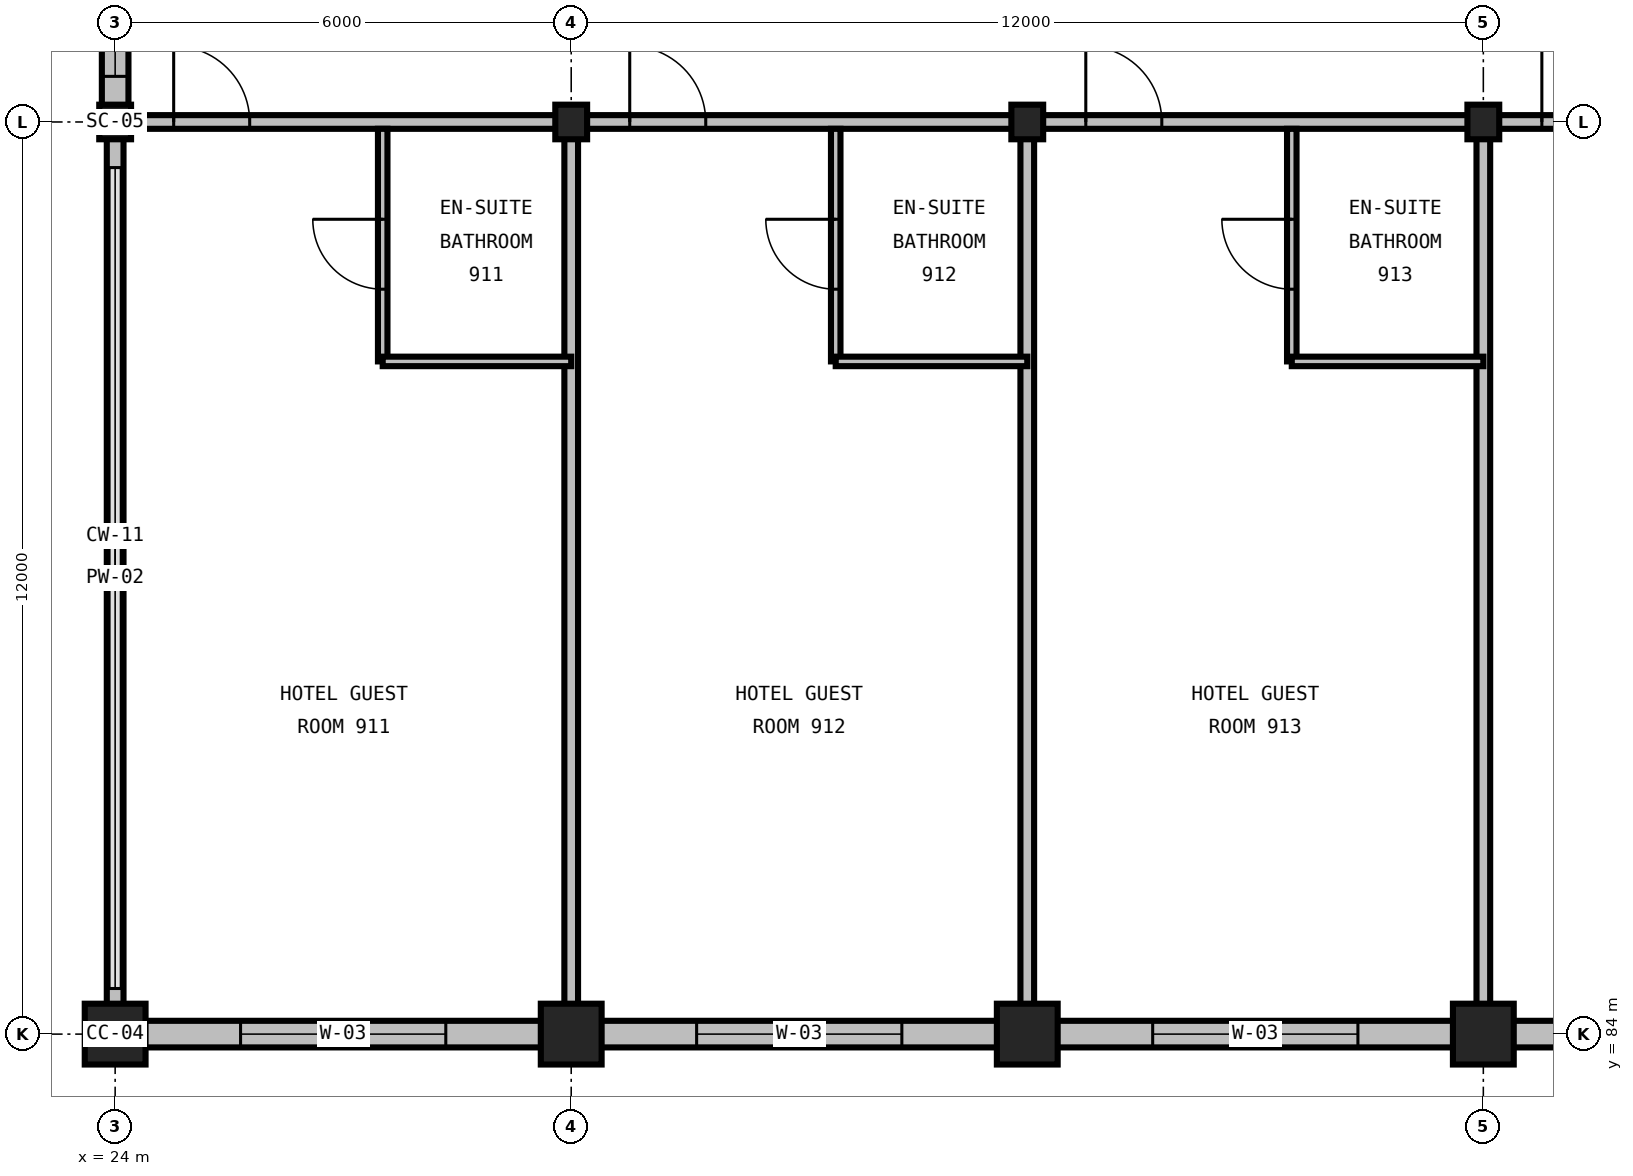
"""IFC4 building model, lengths in metres.
Left out: names, types, materials, properties, quantities, classifications, styles, units other than length and angle.
Written with IfcOpenShell. Run it as: python <this file> out.ifc"""

import sys

from ifc_helpers import new_model, si_unit, direction, frame, frame_2d, origin, origin_2d, place, context, subcontext, project, spatial, rectangle, i_section, extrude, element, fill, save


model = new_model("IFC4")
c1 = context("Model", 3, precision=1e-05, world=origin(), true_north=direction((0.0, 1.0)))
c2 = subcontext(c1, "Body", "Model", "MODEL_VIEW")
j1 = project(units=[si_unit("LENGTHUNIT", "METRE"), si_unit("PLANEANGLEUNIT", "RADIAN")], contexts=[c1])
p1 = place(None, origin())
s1 = spatial("IfcSite", under=j1, at=p1, CompositionType="ELEMENT")
p2 = place(p1, origin())
s2 = spatial("IfcBuilding", under=s1, at=p2, CompositionType="ELEMENT")
p3 = place(p2, frame((0.0, 0.0, 42.0)))
s3 = spatial("IfcBuildingStorey", under=s2, at=p3, CompositionType="ELEMENT", Elevation=42.0)
p4 = place(p3, frame((24.0, 84.0, 0.0), z_axis=(0.0, 0.0, 1.0), x_axis=(1.0, 0.0, 0.0)))
e1 = element("IfcColumn", 1, at=p4, inside=s3, PredefinedType="COLUMN", context=c2, shape_type="SweptSolid", body=[
    extrude(rectangle(XDim=0.8, YDim=0.8, at=origin_2d()), origin(), (0.0, 0.0, 1.0), 3.6),
])
p5 = place(p3, frame((24.0, 96.0, 0.0), z_axis=(0.0, 0.0, 1.0), x_axis=(1.0, 0.0, 0.0)))
e2 = element("IfcColumn", 2, at=p5, inside=s3, PredefinedType="COLUMN", context=c2, shape_type="SweptSolid", body=[
    extrude(i_section(OverallWidth=0.419, OverallDepth=0.455, WebThickness=0.042, FlangeThickness=0.068, FilletRadius=0.031, at=origin_2d()), origin(), (0.0, 0.0, 1.0), 3.6),
])
p6 = place(p3, frame((30.0, 84.0, 0.0), z_axis=(0.0, 0.0, 1.0), x_axis=(1.0, 0.0, 0.0)))
e3 = element("IfcColumn", 3, at=p6, inside=s3, PredefinedType="COLUMN", context=c2, shape_type="SweptSolid", body=[
    extrude(rectangle(XDim=0.8, YDim=0.8, at=origin_2d()), origin(), (0.0, 0.0, 1.0), 3.6),
])
p7 = place(p3, frame((30.0, 96.0, 0.0), z_axis=(0.0, 0.0, 1.0), x_axis=(1.0, 0.0, 0.0)))
e4 = element("IfcColumn", 4, at=p7, inside=s3, PredefinedType="COLUMN", context=c2, shape_type="SweptSolid", body=[
    extrude(i_section(OverallWidth=0.419, OverallDepth=0.455, WebThickness=0.042, FlangeThickness=0.068, FilletRadius=0.031, at=origin_2d()), origin(), (0.0, 0.0, 1.0), 3.6),
])
p8 = place(p3, frame((36.0, 84.0, 0.0), z_axis=(0.0, 0.0, 1.0), x_axis=(1.0, 0.0, 0.0)))
e5 = element("IfcColumn", 5, at=p8, inside=s3, PredefinedType="COLUMN", context=c2, shape_type="SweptSolid", body=[
    extrude(rectangle(XDim=0.8, YDim=0.8, at=origin_2d()), origin(), (0.0, 0.0, 1.0), 3.6),
])
p9 = place(p3, frame((36.0, 96.0, 0.0), z_axis=(0.0, 0.0, 1.0), x_axis=(1.0, 0.0, 0.0)))
e6 = element("IfcColumn", 6, at=p9, inside=s3, PredefinedType="COLUMN", context=c2, shape_type="SweptSolid", body=[
    extrude(i_section(OverallWidth=0.419, OverallDepth=0.455, WebThickness=0.042, FlangeThickness=0.068, FilletRadius=0.031, at=origin_2d()), origin(), (0.0, 0.0, 1.0), 3.6),
])
p10 = place(p3, frame((42.0, 84.0, 0.0), z_axis=(0.0, 0.0, 1.0), x_axis=(1.0, 0.0, 0.0)))
e7 = element("IfcColumn", 7, at=p10, inside=s3, PredefinedType="COLUMN", context=c2, shape_type="SweptSolid", body=[
    extrude(rectangle(XDim=0.8, YDim=0.8, at=origin_2d()), origin(), (0.0, 0.0, 1.0), 3.6),
])
p11 = place(p3, frame((42.0, 96.0, 0.0), z_axis=(0.0, 0.0, 1.0), x_axis=(1.0, 0.0, 0.0)))
e8 = element("IfcColumn", 8, at=p11, inside=s3, PredefinedType="COLUMN", context=c2, shape_type="SweptSolid", body=[
    extrude(i_section(OverallWidth=0.419, OverallDepth=0.455, WebThickness=0.042, FlangeThickness=0.068, FilletRadius=0.031, at=origin_2d()), origin(), (0.0, 0.0, 1.0), 3.6),
])
p12 = place(p3, frame((24.0, 84.0, 0.0), z_axis=(0.0, 0.0, 1.0), x_axis=(1.0, 0.0, 0.0)))
e9 = element("IfcWall", 9, at=p12, inside=s3, PredefinedType="STANDARD", context=c2, shape_type="SweptSolid", body=[
    extrude(rectangle(XDim=6.0, YDim=0.35, at=frame_2d((3.0, 0.0))), origin(), (0.0, 0.0, 1.0), 2.486),
])
p13 = place(p12, frame((1.65, 0.0, 0.72)))
e10 = element("IfcOpeningElement", 10, at=p13, cuts=e9, PredefinedType="OPENING", context=c2, shape_type="SweptSolid", body=[
    extrude(rectangle(XDim=2.7, YDim=1.65, at=frame_2d((1.35, 0.825))), frame((0.0, 0.19, 0.0), z_axis=(0.0, -1.0, 0.0), x_axis=(1.0, 0.0, 0.0)), (0.0, 0.0, 1.0), 0.38),
])
p14 = place(p3, frame((30.0, 84.0, 0.0), z_axis=(0.0, 0.0, 1.0), x_axis=(1.0, 0.0, 0.0)))
e11 = element("IfcWall", 11, at=p14, inside=s3, PredefinedType="STANDARD", context=c2, shape_type="SweptSolid", body=[
    extrude(rectangle(XDim=6.0, YDim=0.35, at=frame_2d((3.0, 0.0))), origin(), (0.0, 0.0, 1.0), 2.486),
])
p15 = place(p14, frame((1.65, 0.0, 0.72)))
e12 = element("IfcOpeningElement", 12, at=p15, cuts=e11, PredefinedType="OPENING", context=c2, shape_type="SweptSolid", body=[
    extrude(rectangle(XDim=2.7, YDim=1.65, at=frame_2d((1.35, 0.825))), frame((0.0, 0.19, 0.0), z_axis=(0.0, -1.0, 0.0), x_axis=(1.0, 0.0, 0.0)), (0.0, 0.0, 1.0), 0.38),
])
p16 = place(p3, frame((36.0, 84.0, 0.0), z_axis=(0.0, 0.0, 1.0), x_axis=(1.0, 0.0, 0.0)))
e13 = element("IfcWall", 13, at=p16, inside=s3, PredefinedType="STANDARD", context=c2, shape_type="SweptSolid", body=[
    extrude(rectangle(XDim=6.0, YDim=0.35, at=frame_2d((3.0, 0.0))), origin(), (0.0, 0.0, 1.0), 2.486),
])
p17 = place(p16, frame((1.65, 0.0, 0.72)))
e14 = element("IfcOpeningElement", 14, at=p17, cuts=e13, PredefinedType="OPENING", context=c2, shape_type="SweptSolid", body=[
    extrude(rectangle(XDim=2.7, YDim=1.65, at=frame_2d((1.35, 0.825))), frame((0.0, 0.19, 0.0), z_axis=(0.0, -1.0, 0.0), x_axis=(1.0, 0.0, 0.0)), (0.0, 0.0, 1.0), 0.38),
])
p18 = place(p3, frame((42.0, 84.0, 0.0), z_axis=(0.0, 0.0, 1.0), x_axis=(1.0, 0.0, 0.0)))
e15 = element("IfcWall", 15, at=p18, inside=s3, PredefinedType="STANDARD", context=c2, shape_type="SweptSolid", body=[
    extrude(rectangle(XDim=12.0, YDim=0.35, at=frame_2d((6.0, 0.0))), origin(), (0.0, 0.0, 1.0), 2.486),
])
p19 = place(p18, frame((1.65, 0.0, 0.72)))
e16 = element("IfcOpeningElement", 16, at=p19, cuts=e15, PredefinedType="OPENING", context=c2, shape_type="SweptSolid", body=[
    extrude(rectangle(XDim=2.7, YDim=1.65, at=frame_2d((1.35, 0.825))), frame((0.0, 0.19, 0.0), z_axis=(0.0, -1.0, 0.0), x_axis=(1.0, 0.0, 0.0)), (0.0, 0.0, 1.0), 0.38),
])
p20 = place(p18, frame((7.65, 0.0, 0.72)))
e17 = element("IfcOpeningElement", 17, at=p20, cuts=e15, PredefinedType="OPENING", context=c2, shape_type="SweptSolid", body=[
    extrude(rectangle(XDim=2.7, YDim=1.65, at=frame_2d((1.35, 0.825))), frame((0.0, 0.19, 0.0), z_axis=(0.0, -1.0, 0.0), x_axis=(1.0, 0.0, 0.0)), (0.0, 0.0, 1.0), 0.38),
])
p21 = place(p3, frame((24.0, 96.0, 0.0), z_axis=(0.0, 0.0, 1.0), x_axis=(0.0, -1.0, 0.0)))
e18 = element("IfcWall", 18, at=p21, inside=s3, PredefinedType="PARAPET", context=c2, shape_type="SweptSolid", body=[
    extrude(rectangle(XDim=12.0, YDim=0.22, at=frame_2d((6.0, 0.0))), origin(), (0.0, 0.0, 1.0), 0.2),
])
p22 = place(p3, frame((24.0, 105.0, 0.0), z_axis=(0.0, 0.0, 1.0), x_axis=(0.0, -1.0, 0.0)))
e19 = element("IfcWall", 19, at=p22, inside=s3, PredefinedType="STANDARD", context=c2, shape_type="SweptSolid", body=[
    extrude(rectangle(XDim=9.0, YDim=0.35, at=frame_2d((4.5, 0.0))), origin(), (0.0, 0.0, 1.0), 2.981),
])
p23 = place(p22, frame((6.6, 0.0, 0.85)))
e20 = element("IfcOpeningElement", 20, at=p23, cuts=e19, PredefinedType="OPENING", context=c2, shape_type="SweptSolid", body=[
    extrude(rectangle(XDim=1.8, YDim=1.5, at=frame_2d((0.9, 0.75))), frame((0.0, 0.19, 0.0), z_axis=(0.0, -1.0, 0.0), x_axis=(1.0, 0.0, 0.0)), (0.0, 0.0, 1.0), 0.38),
])
p24 = place(p3, frame((24.085, 96.0, 0.0), z_axis=(0.0, 0.0, 1.0), x_axis=(1.0, 0.0, 0.0)))
e21 = element("IfcWall", 21, at=p24, inside=s3, PredefinedType="PARTITIONING", context=c2, shape_type="SweptSolid", body=[
    extrude(rectangle(XDim=5.915, YDim=0.18, at=frame_2d((2.957, 0.0))), origin(), (0.0, 0.0, 1.0), 2.736),
])
p25 = place(p24, frame((0.685, 0.0, 0.0)))
e22 = element("IfcOpeningElement", 22, at=p25, cuts=e21, PredefinedType="OPENING", context=c2, shape_type="SweptSolid", body=[
    extrude(rectangle(XDim=1.0, YDim=2.15, at=frame_2d((0.5, 1.075))), frame((0.0, 0.105, 0.0), z_axis=(0.0, -1.0, 0.0), x_axis=(1.0, 0.0, 0.0)), (0.0, 0.0, 1.0), 0.21),
])
p26 = place(p3, frame((30.0, 84.175, 0.0), z_axis=(0.0, 0.0, 1.0), x_axis=(0.0, 1.0, 0.0)))
e23 = element("IfcWall", 23, at=p26, inside=s3, PredefinedType="PARTITIONING", context=c2, shape_type="SweptSolid", body=[
    extrude(rectangle(XDim=11.825, YDim=0.18, at=frame_2d((5.913, 0.0))), origin(), (0.0, 0.0, 1.0), 2.59),
])
p27 = place(p3, frame((27.52, 92.85, 0.0), z_axis=(0.0, 0.0, 1.0), x_axis=(0.0, 1.0, 0.0)))
e24 = element("IfcWall", 24, at=p27, inside=s3, PredefinedType="PARTITIONING", context=c2, shape_type="SweptSolid", body=[
    extrude(rectangle(XDim=3.06, YDim=0.125, at=frame_2d((1.53, 0.0))), origin(), (0.0, 0.0, 1.0), 3.29),
])
p28 = place(p27, frame((0.95, 0.0, 0.0)))
e25 = element("IfcOpeningElement", 25, at=p28, cuts=e24, PredefinedType="OPENING", context=c2, shape_type="SweptSolid", body=[
    extrude(rectangle(XDim=0.92, YDim=2.1, at=frame_2d((0.46, 1.05))), frame((0.0, 0.077, 0.0), z_axis=(0.0, -1.0, 0.0), x_axis=(1.0, 0.0, 0.0)), (0.0, 0.0, 1.0), 0.155),
])
p29 = place(p3, frame((27.52, 92.85, 0.0), z_axis=(0.0, 0.0, 1.0), x_axis=(1.0, 0.0, 0.0)))
e26 = element("IfcWall", 26, at=p29, inside=s3, PredefinedType="PARTITIONING", context=c2, shape_type="SweptSolid", body=[
    extrude(rectangle(XDim=2.48, YDim=0.125, at=frame_2d((1.24, 0.0))), origin(), (0.0, 0.0, 1.0), 3.29),
])
p30 = place(p3, frame((30.0, 96.0, 0.0), z_axis=(0.0, 0.0, 1.0), x_axis=(1.0, 0.0, 0.0)))
e27 = element("IfcWall", 27, at=p30, inside=s3, PredefinedType="PARTITIONING", context=c2, shape_type="SweptSolid", body=[
    extrude(rectangle(XDim=6.0, YDim=0.18, at=frame_2d((3.0, 0.0))), origin(), (0.0, 0.0, 1.0), 2.736),
])
p31 = place(p30, frame((0.77, 0.0, 0.0)))
e28 = element("IfcOpeningElement", 28, at=p31, cuts=e27, PredefinedType="OPENING", context=c2, shape_type="SweptSolid", body=[
    extrude(rectangle(XDim=1.0, YDim=2.15, at=frame_2d((0.5, 1.075))), frame((0.0, 0.105, 0.0), z_axis=(0.0, -1.0, 0.0), x_axis=(1.0, 0.0, 0.0)), (0.0, 0.0, 1.0), 0.21),
])
p32 = place(p3, frame((36.0, 84.175, 0.0), z_axis=(0.0, 0.0, 1.0), x_axis=(0.0, 1.0, 0.0)))
e29 = element("IfcWall", 29, at=p32, inside=s3, PredefinedType="PARTITIONING", context=c2, shape_type="SweptSolid", body=[
    extrude(rectangle(XDim=11.825, YDim=0.18, at=frame_2d((5.913, 0.0))), origin(), (0.0, 0.0, 1.0), 2.59),
])
p33 = place(p3, frame((33.48, 92.85, 0.0), z_axis=(0.0, 0.0, 1.0), x_axis=(0.0, 1.0, 0.0)))
e30 = element("IfcWall", 30, at=p33, inside=s3, PredefinedType="PARTITIONING", context=c2, shape_type="SweptSolid", body=[
    extrude(rectangle(XDim=3.06, YDim=0.125, at=frame_2d((1.53, 0.0))), origin(), (0.0, 0.0, 1.0), 3.29),
])
p34 = place(p33, frame((0.95, 0.0, 0.0)))
e31 = element("IfcOpeningElement", 31, at=p34, cuts=e30, PredefinedType="OPENING", context=c2, shape_type="SweptSolid", body=[
    extrude(rectangle(XDim=0.92, YDim=2.1, at=frame_2d((0.46, 1.05))), frame((0.0, 0.077, 0.0), z_axis=(0.0, -1.0, 0.0), x_axis=(1.0, 0.0, 0.0)), (0.0, 0.0, 1.0), 0.155),
])
p35 = place(p3, frame((33.48, 92.85, 0.0), z_axis=(0.0, 0.0, 1.0), x_axis=(1.0, 0.0, 0.0)))
e32 = element("IfcWall", 32, at=p35, inside=s3, PredefinedType="PARTITIONING", context=c2, shape_type="SweptSolid", body=[
    extrude(rectangle(XDim=2.52, YDim=0.125, at=frame_2d((1.26, 0.0))), origin(), (0.0, 0.0, 1.0), 3.29),
])
p36 = place(p3, frame((36.0, 96.0, 0.0), z_axis=(0.0, 0.0, 1.0), x_axis=(1.0, 0.0, 0.0)))
e33 = element("IfcWall", 33, at=p36, inside=s3, PredefinedType="PARTITIONING", context=c2, shape_type="SweptSolid", body=[
    extrude(rectangle(XDim=6.0, YDim=0.18, at=frame_2d((3.0, 0.0))), origin(), (0.0, 0.0, 1.0), 2.736),
])
p37 = place(p36, frame((0.77, 0.0, 0.0)))
e34 = element("IfcOpeningElement", 34, at=p37, cuts=e33, PredefinedType="OPENING", context=c2, shape_type="SweptSolid", body=[
    extrude(rectangle(XDim=1.0, YDim=2.15, at=frame_2d((0.5, 1.075))), frame((0.0, 0.105, 0.0), z_axis=(0.0, -1.0, 0.0), x_axis=(1.0, 0.0, 0.0)), (0.0, 0.0, 1.0), 0.21),
])
p38 = place(p3, frame((42.0, 84.175, 0.0), z_axis=(0.0, 0.0, 1.0), x_axis=(0.0, 1.0, 0.0)))
e35 = element("IfcWall", 35, at=p38, inside=s3, PredefinedType="PARTITIONING", context=c2, shape_type="SweptSolid", body=[
    extrude(rectangle(XDim=11.825, YDim=0.18, at=frame_2d((5.913, 0.0))), origin(), (0.0, 0.0, 1.0), 2.59),
])
p39 = place(p3, frame((39.48, 92.85, 0.0), z_axis=(0.0, 0.0, 1.0), x_axis=(0.0, 1.0, 0.0)))
e36 = element("IfcWall", 36, at=p39, inside=s3, PredefinedType="PARTITIONING", context=c2, shape_type="SweptSolid", body=[
    extrude(rectangle(XDim=3.06, YDim=0.125, at=frame_2d((1.53, 0.0))), origin(), (0.0, 0.0, 1.0), 3.29),
])
p40 = place(p39, frame((0.95, 0.0, 0.0)))
e37 = element("IfcOpeningElement", 37, at=p40, cuts=e36, PredefinedType="OPENING", context=c2, shape_type="SweptSolid", body=[
    extrude(rectangle(XDim=0.92, YDim=2.1, at=frame_2d((0.46, 1.05))), frame((0.0, 0.077, 0.0), z_axis=(0.0, -1.0, 0.0), x_axis=(1.0, 0.0, 0.0)), (0.0, 0.0, 1.0), 0.155),
])
p41 = place(p3, frame((39.48, 92.85, 0.0), z_axis=(0.0, 0.0, 1.0), x_axis=(1.0, 0.0, 0.0)))
e38 = element("IfcWall", 38, at=p41, inside=s3, PredefinedType="PARTITIONING", context=c2, shape_type="SweptSolid", body=[
    extrude(rectangle(XDim=2.52, YDim=0.125, at=frame_2d((1.26, 0.0))), origin(), (0.0, 0.0, 1.0), 3.29),
])
p42 = place(p3, frame((42.0, 96.0, 0.0), z_axis=(0.0, 0.0, 1.0), x_axis=(1.0, 0.0, 0.0)))
e39 = element("IfcWall", 39, at=p42, inside=s3, PredefinedType="PARTITIONING", context=c2, shape_type="SweptSolid", body=[
    extrude(rectangle(XDim=6.0, YDim=0.18, at=frame_2d((3.0, 0.0))), origin(), (0.0, 0.0, 1.0), 2.359),
])
p43 = place(p42, frame((0.77, 0.0, 0.0)))
e40 = element("IfcOpeningElement", 40, at=p43, cuts=e39, PredefinedType="OPENING", context=c2, shape_type="SweptSolid", body=[
    extrude(rectangle(XDim=1.0, YDim=2.15, at=frame_2d((0.5, 1.075))), frame((0.0, 0.105, 0.0), z_axis=(0.0, -1.0, 0.0), x_axis=(1.0, 0.0, 0.0)), (0.0, 0.0, 1.0), 0.21),
])
p44 = place(p13, origin())
e41 = element("IfcWindow", 41, at=p44, inside=s3, PartitioningType="TRIPLE_PANEL_VERTICAL", PredefinedType="WINDOW", context=c2, shape_type="SweptSolid", body=[
    extrude(rectangle(XDim=2.7, YDim=1.65, at=frame_2d((1.35, 0.825))), frame((0.0, 0.03, 0.0), z_axis=(0.0, -1.0, 0.0), x_axis=(1.0, 0.0, 0.0)), (0.0, 0.0, 1.0), 0.06),
])
fill(e10, e41)
p45 = place(p15, origin())
e42 = element("IfcWindow", 42, at=p45, inside=s3, PartitioningType="TRIPLE_PANEL_VERTICAL", PredefinedType="WINDOW", context=c2, shape_type="SweptSolid", body=[
    extrude(rectangle(XDim=2.7, YDim=1.65, at=frame_2d((1.35, 0.825))), frame((0.0, 0.03, 0.0), z_axis=(0.0, -1.0, 0.0), x_axis=(1.0, 0.0, 0.0)), (0.0, 0.0, 1.0), 0.06),
])
fill(e12, e42)
p46 = place(p17, origin())
e43 = element("IfcWindow", 43, at=p46, inside=s3, PartitioningType="TRIPLE_PANEL_VERTICAL", PredefinedType="WINDOW", context=c2, shape_type="SweptSolid", body=[
    extrude(rectangle(XDim=2.7, YDim=1.65, at=frame_2d((1.35, 0.825))), frame((0.0, 0.03, 0.0), z_axis=(0.0, -1.0, 0.0), x_axis=(1.0, 0.0, 0.0)), (0.0, 0.0, 1.0), 0.06),
])
fill(e14, e43)
p47 = place(p23, origin())
e44 = element("IfcWindow", 44, at=p47, inside=s3, PartitioningType="SINGLE_PANEL", PredefinedType="WINDOW", context=c2, shape_type="SweptSolid", body=[
    extrude(rectangle(XDim=1.8, YDim=1.5, at=frame_2d((0.9, 0.75))), frame((0.0, 0.03, 0.0), z_axis=(0.0, -1.0, 0.0), x_axis=(1.0, 0.0, 0.0)), (0.0, 0.0, 1.0), 0.06),
])
fill(e20, e44)
p48 = place(p25, origin())
e45 = element("IfcDoor", 45, at=p48, inside=s3, OperationType="SINGLE_SWING_LEFT", PredefinedType="DOOR", context=c2, shape_type="SweptSolid", body=[
    extrude(rectangle(XDim=1.0, YDim=2.15, at=frame_2d((0.5, 1.075))), frame((0.0, 0.025, 0.0), z_axis=(0.0, -1.0, 0.0), x_axis=(1.0, 0.0, 0.0)), (0.0, 0.0, 1.0), 0.05),
])
fill(e22, e45)
p49 = place(p28, origin())
e46 = element("IfcDoor", 46, at=p49, inside=s3, OperationType="SINGLE_SWING_RIGHT", PredefinedType="DOOR", context=c2, shape_type="SweptSolid", body=[
    extrude(rectangle(XDim=0.92, YDim=2.1, at=frame_2d((0.46, 1.05))), frame((0.0, 0.025, 0.0), z_axis=(0.0, -1.0, 0.0), x_axis=(1.0, 0.0, 0.0)), (0.0, 0.0, 1.0), 0.05),
])
fill(e25, e46)
p50 = place(p31, origin())
e47 = element("IfcDoor", 47, at=p50, inside=s3, OperationType="SINGLE_SWING_LEFT", PredefinedType="DOOR", context=c2, shape_type="SweptSolid", body=[
    extrude(rectangle(XDim=1.0, YDim=2.15, at=frame_2d((0.5, 1.075))), frame((0.0, 0.025, 0.0), z_axis=(0.0, -1.0, 0.0), x_axis=(1.0, 0.0, 0.0)), (0.0, 0.0, 1.0), 0.05),
])
fill(e28, e47)
p51 = place(p34, origin())
e48 = element("IfcDoor", 48, at=p51, inside=s3, OperationType="SINGLE_SWING_RIGHT", PredefinedType="DOOR", context=c2, shape_type="SweptSolid", body=[
    extrude(rectangle(XDim=0.92, YDim=2.1, at=frame_2d((0.46, 1.05))), frame((0.0, 0.025, 0.0), z_axis=(0.0, -1.0, 0.0), x_axis=(1.0, 0.0, 0.0)), (0.0, 0.0, 1.0), 0.05),
])
fill(e31, e48)
p52 = place(p37, origin())
e49 = element("IfcDoor", 49, at=p52, inside=s3, OperationType="SINGLE_SWING_LEFT", PredefinedType="DOOR", context=c2, shape_type="SweptSolid", body=[
    extrude(rectangle(XDim=1.0, YDim=2.15, at=frame_2d((0.5, 1.075))), frame((0.0, 0.025, 0.0), z_axis=(0.0, -1.0, 0.0), x_axis=(1.0, 0.0, 0.0)), (0.0, 0.0, 1.0), 0.05),
])
fill(e34, e49)
p53 = place(p40, origin())
e50 = element("IfcDoor", 50, at=p53, inside=s3, OperationType="SINGLE_SWING_RIGHT", PredefinedType="DOOR", context=c2, shape_type="SweptSolid", body=[
    extrude(rectangle(XDim=0.92, YDim=2.1, at=frame_2d((0.46, 1.05))), frame((0.0, 0.025, 0.0), z_axis=(0.0, -1.0, 0.0), x_axis=(1.0, 0.0, 0.0)), (0.0, 0.0, 1.0), 0.05),
])
fill(e37, e50)
p54 = place(p43, origin())
e51 = element("IfcDoor", 51, at=p54, inside=s3, OperationType="SINGLE_SWING_LEFT", PredefinedType="DOOR", context=c2, shape_type="SweptSolid", body=[
    extrude(rectangle(XDim=1.0, YDim=2.15, at=frame_2d((0.5, 1.075))), frame((0.0, 0.025, 0.0), z_axis=(0.0, -1.0, 0.0), x_axis=(1.0, 0.0, 0.0)), (0.0, 0.0, 1.0), 0.05),
])
fill(e40, e51)
save(model, sys.argv[1])
